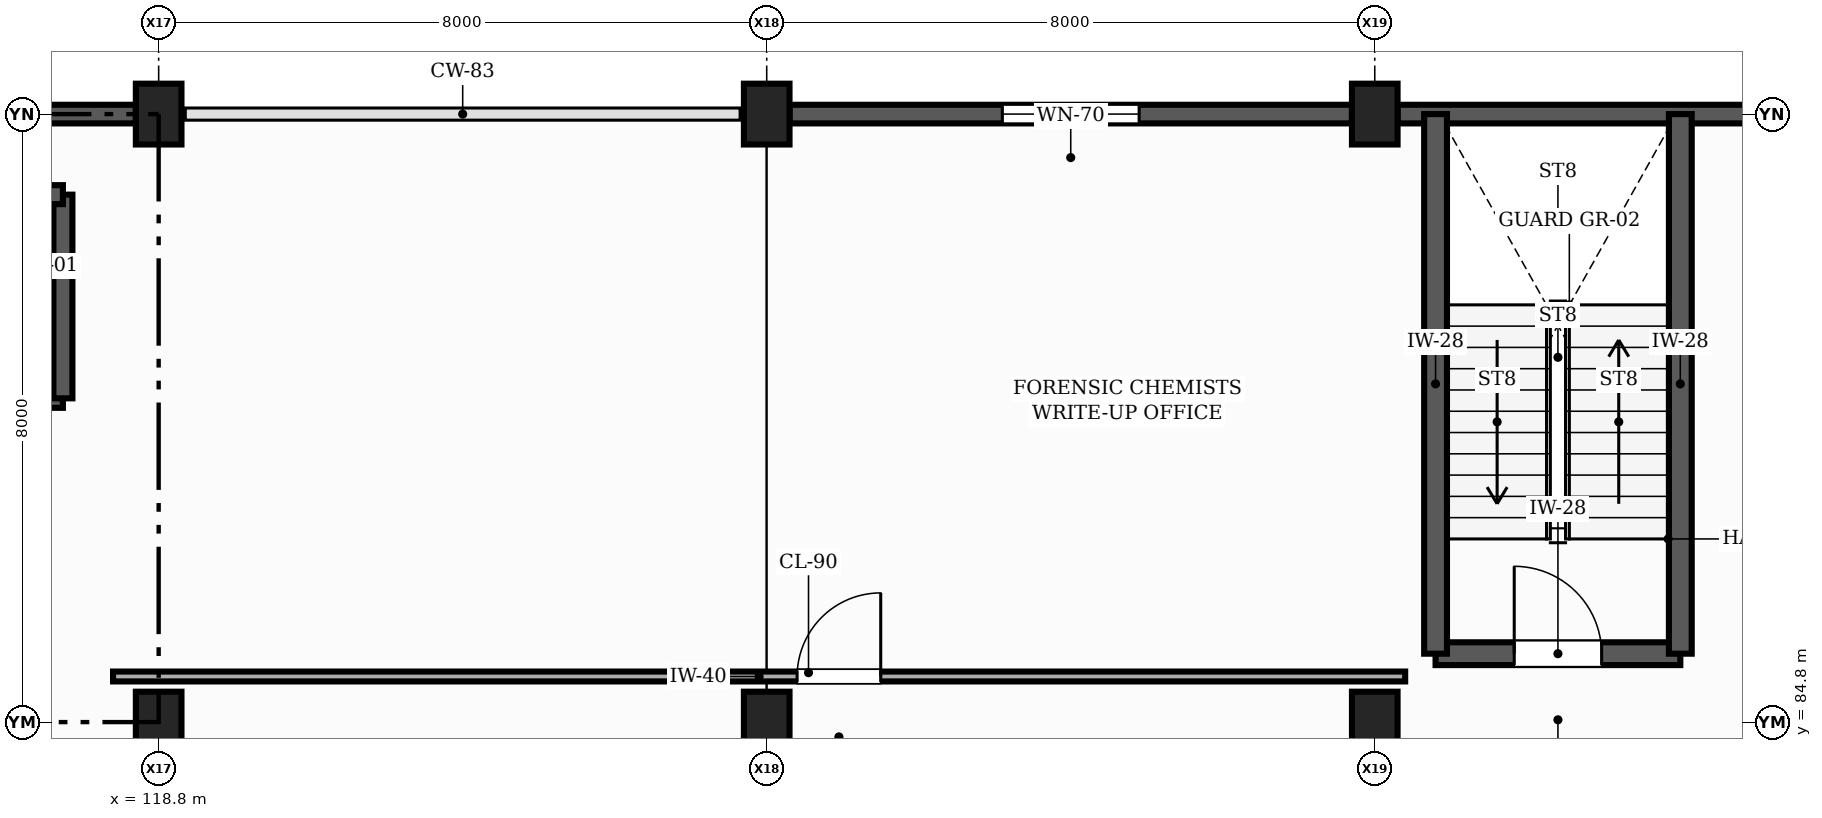
"""IFC4 building model, lengths in metres.
Left out: names, types, materials, properties, quantities, classifications, styles, units other than length and angle.
Written with IfcOpenShell. Run it as: python <this file> out.ifc"""

import sys

from ifc_helpers import new_model, si_unit, direction, frame, frame_2d, origin, origin_2d, place, context, subcontext, project, spatial, rectangle, extrude, element, fill, save


model = new_model("IFC4")
c1 = context("Model", 3, precision=1e-05, world=origin(), true_north=direction((0.0, 1.0)))
c2 = subcontext(c1, "Body", "Model", "MODEL_VIEW")
j1 = project(units=[si_unit("LENGTHUNIT", "METRE"), si_unit("PLANEANGLEUNIT", "RADIAN")], contexts=[c1])
p1 = place(None, origin())
s1 = spatial("IfcSite", under=j1, at=p1, CompositionType="ELEMENT")
p2 = place(p1, origin())
s2 = spatial("IfcBuilding", under=s1, at=p2, CompositionType="ELEMENT")
p3 = place(p2, frame((0.0, 0.0, 4.8)))
s3 = spatial("IfcBuildingStorey", under=s2, at=p3, CompositionType="ELEMENT", Elevation=4.8)
for number, where, z_axis, x_axis in (
    (1, (118.8, 84.8, 0.0), (0.0, 0.0, 1.0), (1.0, 0.0, 0.0)),
    (2, (118.8, 92.8, 0.0), (0.0, 0.0, 1.0), (1.0, 0.0, 0.0)),
    (3, (126.8, 84.8, 0.0), (0.0, 0.0, 1.0), (1.0, 0.0, 0.0)),
    (4, (126.8, 92.8, 0.0), (0.0, 0.0, 1.0), (1.0, 0.0, 0.0)),
    (5, (134.8, 84.8, 0.0), (0.0, 0.0, 1.0), (1.0, 0.0, 0.0)),
    (6, (134.8, 92.8, 0.0), (0.0, 0.0, 1.0), (1.0, 0.0, 0.0)),
):
    element("IfcColumn", number, at=place(p3, frame(where, z_axis=z_axis, x_axis=x_axis)), inside=s3, PredefinedType="COLUMN", context=c2, shape_type="SweptSolid", body=[
        extrude(rectangle(XDim=0.6, YDim=0.8, at=origin_2d()), origin(), (0.0, 0.0, 1.0), 4.2),
    ])
p4 = place(p3, frame((142.5, 92.8, 0.0), z_axis=(0.0, 0.0, 1.0), x_axis=(-1.0, 0.0, 0.0)))
e7 = element("IfcWall", 7, at=p4, inside=s3, PredefinedType="SOLIDWALL", context=c2, shape_type="SweptSolid", body=[
    extrude(rectangle(XDim=7.4, YDim=0.245, at=frame_2d((3.7, 0.0))), origin(), (0.0, 0.0, 1.0), 3.91),
])
p5 = place(p3, frame((134.5, 92.8, 0.0), z_axis=(0.0, 0.0, 1.0), x_axis=(-1.0, 0.0, 0.0)))
e8 = element("IfcWall", 8, at=p5, inside=s3, PredefinedType="SOLIDWALL", context=c2, shape_type="SweptSolid", body=[
    extrude(rectangle(XDim=7.4, YDim=0.245, at=frame_2d((3.7, 0.0))), origin(), (0.0, 0.0, 1.0), 3.16),
])
p6 = place(p5, frame((2.8, 0.0, 0.9)))
e9 = element("IfcOpeningElement", 9, at=p6, cuts=e8, PredefinedType="OPENING", context=c2, shape_type="SweptSolid", body=[
    extrude(rectangle(XDim=1.8, YDim=1.4, at=frame_2d((0.9, 0.7))), frame((0.0, 0.133, 0.0), z_axis=(0.0, -1.0, 0.0), x_axis=(1.0, 0.0, 0.0)), (0.0, 0.0, 1.0), 0.265),
])
p7 = place(p3, frame((118.5, 92.8, 0.0), z_axis=(0.0, 0.0, 1.0), x_axis=(-1.0, 0.0, 0.0)))
e10 = element("IfcWall", 10, at=p7, inside=s3, PredefinedType="SOLIDWALL", context=c2, shape_type="SweptSolid", body=[
    extrude(rectangle(XDim=7.4, YDim=0.245, at=frame_2d((3.7, 0.0))), origin(), (0.0, 0.0, 1.0), 3.91),
])
p8 = place(p3, frame((115.46, 89.06, 0.0), z_axis=(0.0, 0.0, 1.0), x_axis=(1.0, 0.0, 0.0)))
e11 = element("IfcWall", 11, at=p8, inside=s3, PredefinedType="SHEAR", context=c2, shape_type="SweptSolid", body=[
    extrude(rectangle(XDim=2.08, YDim=0.25, at=frame_2d((1.04, 0.0))), origin(), (0.0, 0.0, 1.0), 4.2),
])
p9 = place(p8, frame((0.39, 0.0, 0.0)))
e12 = element("IfcOpeningElement", 12, at=p9, cuts=e11, PredefinedType="OPENING", context=c2, shape_type="SweptSolid", body=[
    extrude(rectangle(XDim=1.3, YDim=2.25, at=frame_2d((0.65, 1.125))), frame((0.0, 0.135, 0.0), z_axis=(0.0, -1.0, 0.0), x_axis=(1.0, 0.0, 0.0)), (0.0, 0.0, 1.0), 0.27),
])
p10 = place(p3, frame((117.54, 89.06, 0.0), z_axis=(0.0, 0.0, 1.0), x_axis=(0.0, 1.0, 0.0)))
e13 = element("IfcWall", 13, at=p10, inside=s3, PredefinedType="SHEAR", context=c2, shape_type="SweptSolid", body=[
    extrude(rectangle(XDim=2.68, YDim=0.25, at=frame_2d((1.34, 0.0))), origin(), (0.0, 0.0, 1.0), 4.2),
])
p11 = place(p3, frame((117.54, 91.74, 0.0), z_axis=(0.0, 0.0, 1.0), x_axis=(-1.0, 0.0, 0.0)))
e14 = element("IfcWall", 14, at=p11, inside=s3, PredefinedType="SHEAR", context=c2, shape_type="SweptSolid", body=[
    extrude(rectangle(XDim=2.08, YDim=0.25, at=frame_2d((1.04, 0.0))), origin(), (0.0, 0.0, 1.0), 4.2),
])
p12 = place(p3, frame((135.6, 85.7, 0.0), z_axis=(0.0, 0.0, 1.0), x_axis=(1.0, 0.0, 0.0)))
e15 = element("IfcWall", 15, at=p12, inside=s3, PredefinedType="SHEAR", context=c2, shape_type="SweptSolid", body=[
    extrude(rectangle(XDim=3.22, YDim=0.3, at=frame_2d((1.61, 0.0))), origin(), (0.0, 0.0, 1.0), 4.2),
])
p13 = place(p12, frame((1.035, 0.0, 0.0)))
e16 = element("IfcOpeningElement", 16, at=p13, cuts=e15, PredefinedType="OPENING", context=c2, shape_type="SweptSolid", body=[
    extrude(rectangle(XDim=1.15, YDim=2.15, at=frame_2d((0.575, 1.075))), frame((0.0, 0.16, 0.0), z_axis=(0.0, -1.0, 0.0), x_axis=(1.0, 0.0, 0.0)), (0.0, 0.0, 1.0), 0.32),
])
for number, where, z_axis, x_axis in (
    (17, (138.82, 85.7, 0.0), (0.0, 0.0, 1.0), (0.0, 1.0, 0.0)),
    (18, (135.6, 92.8, 0.0), (0.0, 0.0, 1.0), (0.0, -1.0, 0.0)),
):
    element("IfcWall", number, at=place(p3, frame(where, z_axis=z_axis, x_axis=x_axis)), inside=s3, PredefinedType="SHEAR", context=c2, shape_type="SweptSolid", body=[
        extrude(rectangle(XDim=7.1, YDim=0.3, at=frame_2d((3.55, 0.0))), origin(), (0.0, 0.0, 1.0), 4.2),
    ])
p14 = place(p3, frame((118.2, 85.4, 0.0), z_axis=(0.0, 0.0, 1.0), x_axis=(1.0, 0.0, 0.0)))
e19 = element("IfcWall", 19, at=p14, inside=s3, PredefinedType="PARTITIONING", context=c2, shape_type="SweptSolid", body=[
    extrude(rectangle(XDim=17.0, YDim=0.13, at=frame_2d((8.5, 0.0))), origin(), (0.0, 0.0, 1.0), 3.245),
])
p15 = place(p14, frame((9.0, 0.0, 0.0)))
e20 = element("IfcOpeningElement", 20, at=p15, cuts=e19, PredefinedType="OPENING", context=c2, shape_type="SweptSolid", body=[
    extrude(rectangle(XDim=1.1, YDim=2.1, at=frame_2d((0.55, 1.05))), frame((0.0, 0.075, 0.0), z_axis=(0.0, -1.0, 0.0), x_axis=(1.0, 0.0, 0.0)), (0.0, 0.0, 1.0), 0.15),
])
p16 = place(p6, origin())
e21 = element("IfcWindow", 21, at=p16, inside=s3, PartitioningType="SINGLE_PANEL", PredefinedType="WINDOW", context=c2, shape_type="SweptSolid", body=[
    extrude(rectangle(XDim=1.8, YDim=1.4, at=frame_2d((0.9, 0.7))), frame((0.0, 0.03, 0.0), z_axis=(0.0, -1.0, 0.0), x_axis=(1.0, 0.0, 0.0)), (0.0, 0.0, 1.0), 0.06),
])
fill(e9, e21)
p17 = place(p13, origin())
e22 = element("IfcDoor", 22, at=p17, inside=s3, OperationType="SINGLE_SWING_LEFT", PredefinedType="DOOR", context=c2, shape_type="SweptSolid", body=[
    extrude(rectangle(XDim=1.15, YDim=2.15, at=frame_2d((0.575, 1.075))), frame((0.0, 0.025, 0.0), z_axis=(0.0, -1.0, 0.0), x_axis=(1.0, 0.0, 0.0)), (0.0, 0.0, 1.0), 0.05),
])
fill(e16, e22)
p18 = place(p15, origin())
e23 = element("IfcDoor", 23, at=p18, inside=s3, OperationType="SINGLE_SWING_RIGHT", PredefinedType="DOOR", context=c2, shape_type="SweptSolid", body=[
    extrude(rectangle(XDim=1.1, YDim=2.1, at=frame_2d((0.55, 1.05))), frame((0.0, 0.025, 0.0), z_axis=(0.0, -1.0, 0.0), x_axis=(1.0, 0.0, 0.0)), (0.0, 0.0, 1.0), 0.05),
])
fill(e20, e23)
save(model, sys.argv[1])
